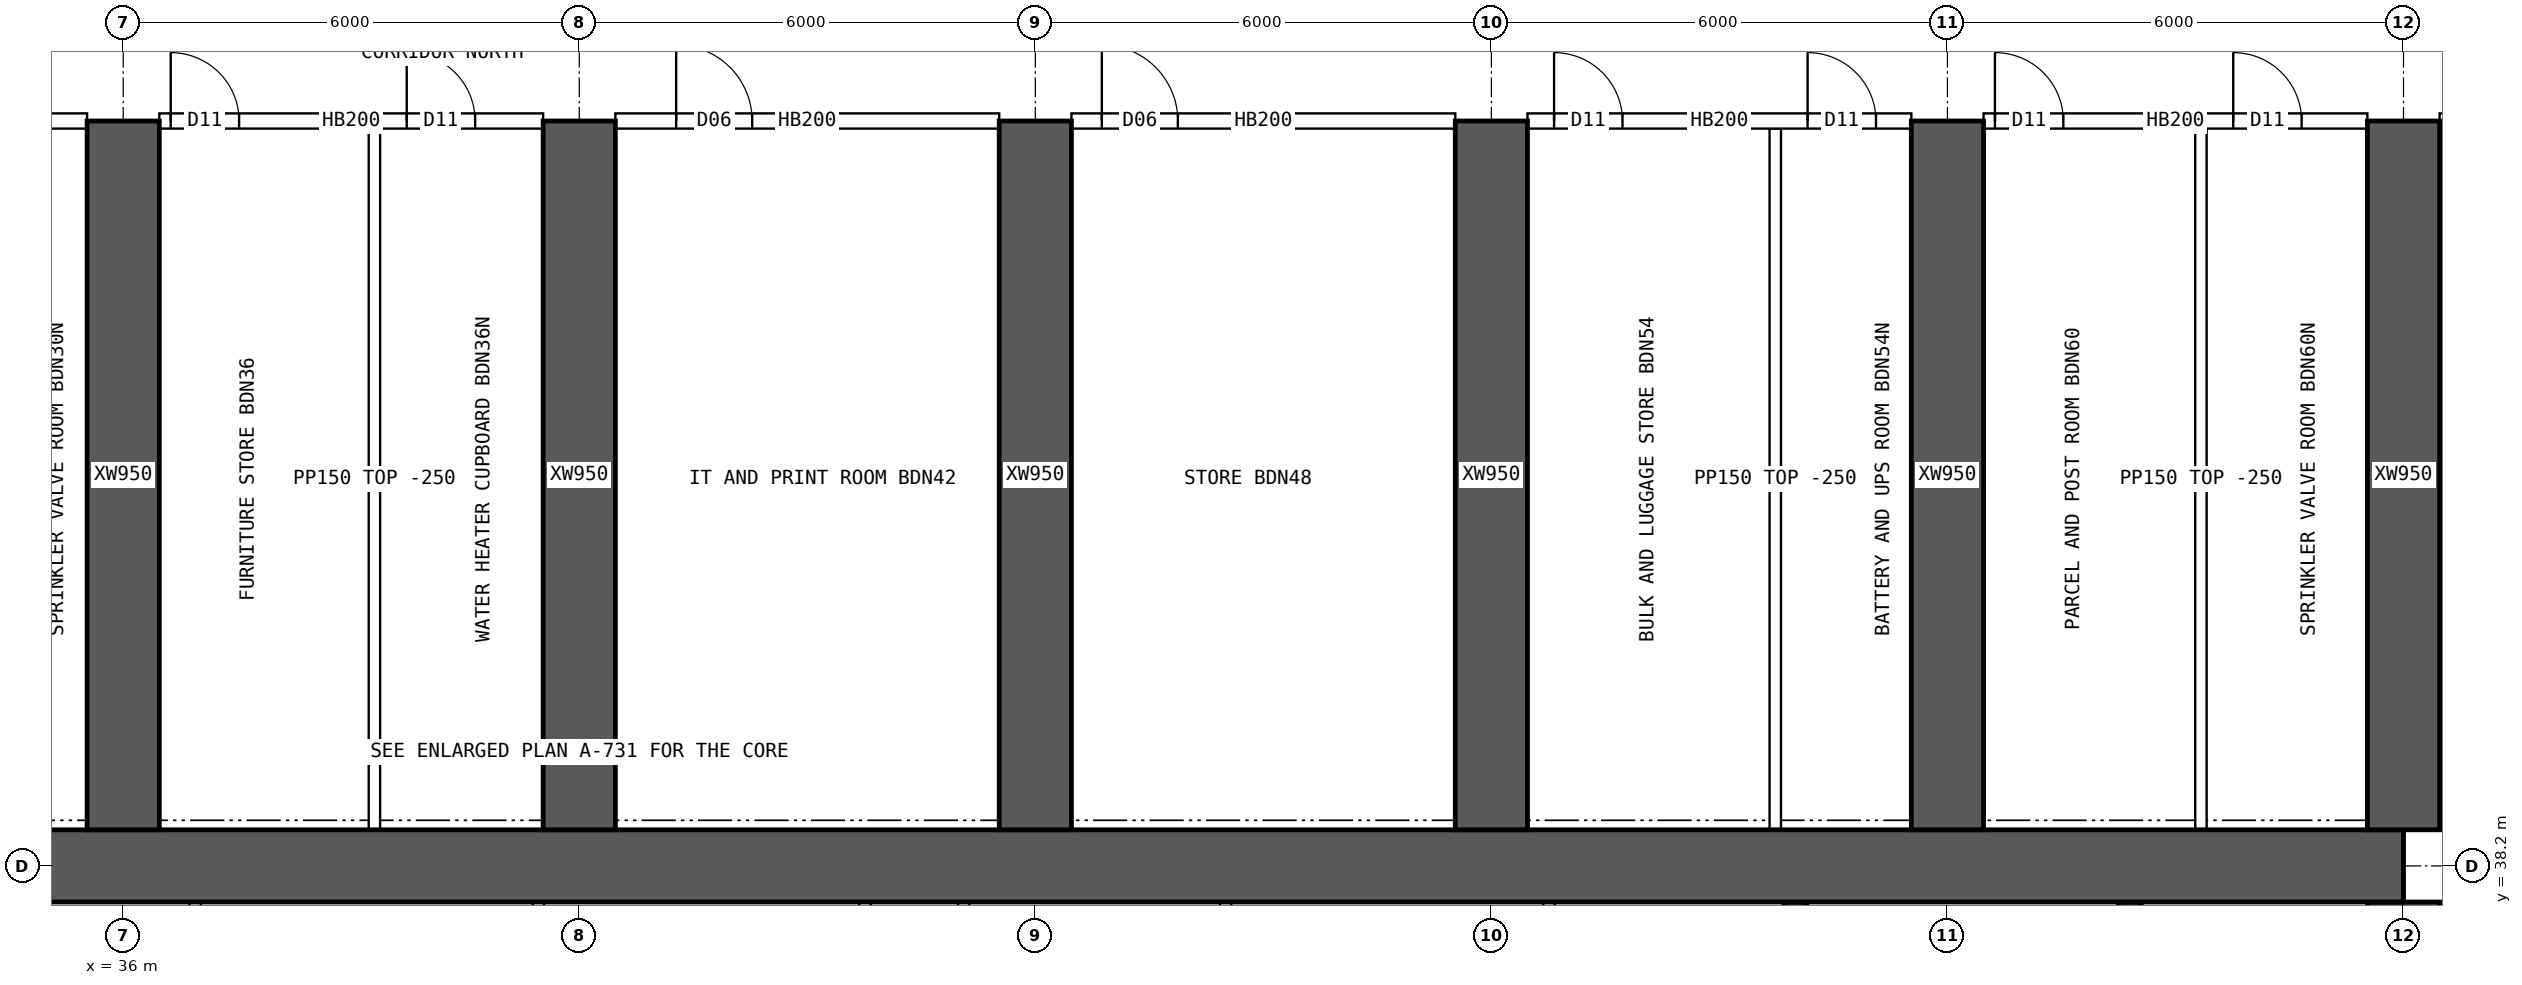
"""IFC4 building model, lengths in metres.
Left out: names, types, materials, properties, quantities, classifications, styles, units other than length and angle.
Written with IfcOpenShell. Run it as: python <this file> out.ifc"""

import sys

from ifc_helpers import new_model, si_unit, direction, frame, frame_2d, origin, place, context, subcontext, project, spatial, rectangle, extrude, element, fill, save


model = new_model("IFC4")
c1 = context("Model", 3, precision=1e-05, world=origin(), true_north=direction((0.0, 1.0)))
c2 = subcontext(c1, "Body", "Model", "MODEL_VIEW")
j1 = project(units=[si_unit("LENGTHUNIT", "METRE"), si_unit("PLANEANGLEUNIT", "RADIAN")], contexts=[c1])
p1 = place(None, origin())
s1 = spatial("IfcSite", under=j1, at=p1, CompositionType="ELEMENT")
p2 = place(p1, origin())
s2 = spatial("IfcBuilding", under=s1, at=p2, CompositionType="ELEMENT")
p3 = place(p2, frame((0.0, 0.0, 114.4)))
s3 = spatial("IfcBuildingStorey", under=s2, at=p3, CompositionType="ELEMENT", Elevation=114.4)
p4 = place(p3, frame((18.0, 38.2, 0.0), z_axis=(0.0, 0.0, 1.0), x_axis=(1.0, 0.0, 0.0)))
e1 = element("IfcWall", 1, at=p4, inside=s3, PredefinedType="SHEAR", context=c2, shape_type="SweptSolid", body=[
    extrude(rectangle(XDim=48.0, YDim=0.95, at=frame_2d((24.0, 0.0))), origin(), (0.0, 0.0, 1.0), 3.75),
])
p5 = place(p3, frame((66.0, 26.275, 0.0), z_axis=(0.0, 0.0, 1.0), x_axis=(0.0, 1.0, 0.0)))
e2 = element("IfcWall", 2, at=p5, inside=s3, PredefinedType="SHEAR", context=c2, shape_type="SweptSolid", body=[
    extrude(rectangle(XDim=11.45, YDim=0.95, at=frame_2d((5.725, 0.0))), origin(), (0.0, 0.0, 1.0), 3.75),
])
p6 = place(p5, frame((5.025, 0.0, 0.0)))
e3 = element("IfcOpeningElement", 3, at=p6, cuts=e2, PredefinedType="OPENING", context=c2, shape_type="SweptSolid", body=[
    extrude(rectangle(XDim=1.2, YDim=2.1, at=frame_2d((0.6, 1.05))), frame((0.0, 0.485, 0.0), z_axis=(0.0, -1.0, 0.0), x_axis=(1.0, 0.0, 0.0)), (0.0, 0.0, 1.0), 0.97),
])
for number, where, z_axis, x_axis in (
    (4, (62.4, 34.75, 0.0), (0.0, 0.0, 1.0), (0.0, 1.0, 0.0)),
    (5, (58.0, 34.75, 0.0), (0.0, 0.0, 1.0), (0.0, 1.0, 0.0)),
):
    element("IfcWall", number, at=place(p3, frame(where, z_axis=z_axis, x_axis=x_axis)), inside=s3, PredefinedType="SHEAR", context=c2, shape_type="SweptSolid", body=[
        extrude(rectangle(XDim=2.975, YDim=0.3, at=frame_2d((1.488, 0.0))), origin(), (0.0, 0.0, 1.0), 3.75),
    ])
for number, where, z_axis, x_axis in (
    (6, (36.0, 38.675, 0.0), (0.0, 0.0, 1.0), (0.0, 1.0, 0.0)),
    (7, (42.0, 38.675, 0.0), (0.0, 0.0, 1.0), (0.0, 1.0, 0.0)),
    (8, (48.0, 38.675, 0.0), (0.0, 0.0, 1.0), (0.0, 1.0, 0.0)),
    (9, (54.0, 38.675, 0.0), (0.0, 0.0, 1.0), (0.0, 1.0, 0.0)),
    (10, (60.0, 38.675, 0.0), (0.0, 0.0, 1.0), (0.0, 1.0, 0.0)),
    (11, (66.0, 38.675, 0.0), (0.0, 0.0, 1.0), (0.0, 1.0, 0.0)),
):
    element("IfcWall", number, at=place(p3, frame(where, z_axis=z_axis, x_axis=x_axis)), inside=s3, PredefinedType="SHEAR", context=c2, shape_type="SweptSolid", body=[
        extrude(rectangle(XDim=9.325, YDim=0.95, at=frame_2d((4.663, 0.0))), origin(), (0.0, 0.0, 1.0), 3.75),
    ])
for number, where, z_axis, x_axis in (
    (12, (36.946, 34.75, 0.0), (0.0, 0.0, 1.0), (0.0, 1.0, 0.0)),
    (13, (41.463, 34.75, 0.0), (0.0, 0.0, 1.0), (0.0, 1.0, 0.0)),
    (14, (45.758, 34.75, 0.0), (0.0, 0.0, 1.0), (0.0, 1.0, 0.0)),
    (15, (47.058, 34.75, 0.0), (0.0, 0.0, 1.0), (0.0, 1.0, 0.0)),
    (16, (50.503, 34.75, 0.0), (0.0, 0.0, 1.0), (0.0, 1.0, 0.0)),
    (17, (54.758, 34.75, 0.0), (0.0, 0.0, 1.0), (0.0, 1.0, 0.0)),
):
    element("IfcWall", number, at=place(p3, frame(where, z_axis=z_axis, x_axis=x_axis)), inside=s3, PredefinedType="SOLIDWALL", context=c2, shape_type="SweptSolid", body=[
        extrude(rectangle(XDim=2.975, YDim=0.15, at=frame_2d((1.488, 0.0))), origin(), (0.0, 0.0, 1.0), 3.5),
    ])
p7 = place(p3, frame((30.475, 48.0, 0.0), z_axis=(0.0, 0.0, 1.0), x_axis=(1.0, 0.0, 0.0)))
e18 = element("IfcWall", 18, at=p7, inside=s3, PredefinedType="SOLIDWALL", context=c2, shape_type="SweptSolid", body=[
    extrude(rectangle(XDim=5.05, YDim=0.2, at=frame_2d((2.525, 0.0))), origin(), (0.0, 0.0, 1.0), 3.5),
])
p8 = place(p7, frame((0.35, 0.0, 0.0)))
e19 = element("IfcOpeningElement", 19, at=p8, cuts=e18, PredefinedType="OPENING", context=c2, shape_type="SweptSolid", body=[
    extrude(rectangle(XDim=0.9, YDim=2.1, at=frame_2d((0.45, 1.05))), frame((0.0, 0.11, 0.0), z_axis=(0.0, -1.0, 0.0), x_axis=(1.0, 0.0, 0.0)), (0.0, 0.0, 1.0), 0.22),
])
p9 = place(p7, frame((3.635, 0.0, 0.0)))
e20 = element("IfcOpeningElement", 20, at=p9, cuts=e18, PredefinedType="OPENING", context=c2, shape_type="SweptSolid", body=[
    extrude(rectangle(XDim=0.9, YDim=2.1, at=frame_2d((0.45, 1.05))), frame((0.0, 0.11, 0.0), z_axis=(0.0, -1.0, 0.0), x_axis=(1.0, 0.0, 0.0)), (0.0, 0.0, 1.0), 0.22),
])
p10 = place(p3, frame((36.475, 48.0, 0.0), z_axis=(0.0, 0.0, 1.0), x_axis=(1.0, 0.0, 0.0)))
e21 = element("IfcWall", 21, at=p10, inside=s3, PredefinedType="SOLIDWALL", context=c2, shape_type="SweptSolid", body=[
    extrude(rectangle(XDim=5.05, YDim=0.2, at=frame_2d((2.525, 0.0))), origin(), (0.0, 0.0, 1.0), 3.5),
])
p11 = place(p10, frame((0.15, 0.0, 0.0)))
e22 = element("IfcOpeningElement", 22, at=p11, cuts=e21, PredefinedType="OPENING", context=c2, shape_type="SweptSolid", body=[
    extrude(rectangle(XDim=0.9, YDim=2.1, at=frame_2d((0.45, 1.05))), frame((0.0, 0.11, 0.0), z_axis=(0.0, -1.0, 0.0), x_axis=(1.0, 0.0, 0.0)), (0.0, 0.0, 1.0), 0.22),
])
p12 = place(p10, frame((3.255, 0.0, 0.0)))
e23 = element("IfcOpeningElement", 23, at=p12, cuts=e21, PredefinedType="OPENING", context=c2, shape_type="SweptSolid", body=[
    extrude(rectangle(XDim=0.9, YDim=2.1, at=frame_2d((0.45, 1.05))), frame((0.0, 0.11, 0.0), z_axis=(0.0, -1.0, 0.0), x_axis=(1.0, 0.0, 0.0)), (0.0, 0.0, 1.0), 0.22),
])
p13 = place(p3, frame((42.475, 48.0, 0.0), z_axis=(0.0, 0.0, 1.0), x_axis=(1.0, 0.0, 0.0)))
e24 = element("IfcWall", 24, at=p13, inside=s3, PredefinedType="SOLIDWALL", context=c2, shape_type="SweptSolid", body=[
    extrude(rectangle(XDim=5.05, YDim=0.2, at=frame_2d((2.525, 0.0))), origin(), (0.0, 0.0, 1.0), 3.5),
])
p14 = place(p13, frame((0.8, 0.0, 0.0)))
e25 = element("IfcOpeningElement", 25, at=p14, cuts=e24, PredefinedType="OPENING", context=c2, shape_type="SweptSolid", body=[
    extrude(rectangle(XDim=1.0, YDim=2.1, at=frame_2d((0.5, 1.05))), frame((0.0, 0.11, 0.0), z_axis=(0.0, -1.0, 0.0), x_axis=(1.0, 0.0, 0.0)), (0.0, 0.0, 1.0), 0.22),
])
p15 = place(p3, frame((48.475, 48.0, 0.0), z_axis=(0.0, 0.0, 1.0), x_axis=(1.0, 0.0, 0.0)))
e26 = element("IfcWall", 26, at=p15, inside=s3, PredefinedType="SOLIDWALL", context=c2, shape_type="SweptSolid", body=[
    extrude(rectangle(XDim=5.05, YDim=0.2, at=frame_2d((2.525, 0.0))), origin(), (0.0, 0.0, 1.0), 3.5),
])
p16 = place(p15, frame((0.4, 0.0, 0.0)))
e27 = element("IfcOpeningElement", 27, at=p16, cuts=e26, PredefinedType="OPENING", context=c2, shape_type="SweptSolid", body=[
    extrude(rectangle(XDim=1.0, YDim=2.1, at=frame_2d((0.5, 1.05))), frame((0.0, 0.11, 0.0), z_axis=(0.0, -1.0, 0.0), x_axis=(1.0, 0.0, 0.0)), (0.0, 0.0, 1.0), 0.22),
])
p17 = place(p3, frame((54.475, 48.0, 0.0), z_axis=(0.0, 0.0, 1.0), x_axis=(1.0, 0.0, 0.0)))
e28 = element("IfcWall", 28, at=p17, inside=s3, PredefinedType="SOLIDWALL", context=c2, shape_type="SweptSolid", body=[
    extrude(rectangle(XDim=5.05, YDim=0.2, at=frame_2d((2.525, 0.0))), origin(), (0.0, 0.0, 1.0), 3.5),
])
p18 = place(p17, frame((0.35, 0.0, 0.0)))
e29 = element("IfcOpeningElement", 29, at=p18, cuts=e28, PredefinedType="OPENING", context=c2, shape_type="SweptSolid", body=[
    extrude(rectangle(XDim=0.9, YDim=2.1, at=frame_2d((0.45, 1.05))), frame((0.0, 0.11, 0.0), z_axis=(0.0, -1.0, 0.0), x_axis=(1.0, 0.0, 0.0)), (0.0, 0.0, 1.0), 0.22),
])
p19 = place(p17, frame((3.685, 0.0, 0.0)))
e30 = element("IfcOpeningElement", 30, at=p19, cuts=e28, PredefinedType="OPENING", context=c2, shape_type="SweptSolid", body=[
    extrude(rectangle(XDim=0.9, YDim=2.1, at=frame_2d((0.45, 1.05))), frame((0.0, 0.11, 0.0), z_axis=(0.0, -1.0, 0.0), x_axis=(1.0, 0.0, 0.0)), (0.0, 0.0, 1.0), 0.22),
])
p20 = place(p3, frame((60.475, 48.0, 0.0), z_axis=(0.0, 0.0, 1.0), x_axis=(1.0, 0.0, 0.0)))
e31 = element("IfcWall", 31, at=p20, inside=s3, PredefinedType="SOLIDWALL", context=c2, shape_type="SweptSolid", body=[
    extrude(rectangle(XDim=5.05, YDim=0.2, at=frame_2d((2.525, 0.0))), origin(), (0.0, 0.0, 1.0), 3.5),
])
p21 = place(p20, frame((0.15, 0.0, 0.0)))
e32 = element("IfcOpeningElement", 32, at=p21, cuts=e31, PredefinedType="OPENING", context=c2, shape_type="SweptSolid", body=[
    extrude(rectangle(XDim=0.9, YDim=2.1, at=frame_2d((0.45, 1.05))), frame((0.0, 0.11, 0.0), z_axis=(0.0, -1.0, 0.0), x_axis=(1.0, 0.0, 0.0)), (0.0, 0.0, 1.0), 0.22),
])
p22 = place(p20, frame((3.285, 0.0, 0.0)))
e33 = element("IfcOpeningElement", 33, at=p22, cuts=e31, PredefinedType="OPENING", context=c2, shape_type="SweptSolid", body=[
    extrude(rectangle(XDim=0.9, YDim=2.1, at=frame_2d((0.45, 1.05))), frame((0.0, 0.11, 0.0), z_axis=(0.0, -1.0, 0.0), x_axis=(1.0, 0.0, 0.0)), (0.0, 0.0, 1.0), 0.22),
])
p23 = place(p3, frame((66.475, 48.0, 0.0), z_axis=(0.0, 0.0, 1.0), x_axis=(1.0, 0.0, 0.0)))
e34 = element("IfcWall", 34, at=p23, inside=s3, PredefinedType="SOLIDWALL", context=c2, shape_type="SweptSolid", body=[
    extrude(rectangle(XDim=1.925, YDim=0.2, at=frame_2d((0.962, 0.0))), origin(), (0.0, 0.0, 1.0), 3.5),
])
p24 = place(p23, frame((0.05, 0.0, 0.0)))
e35 = element("IfcOpeningElement", 35, at=p24, cuts=e34, PredefinedType="OPENING", context=c2, shape_type="SweptSolid", body=[
    extrude(rectangle(XDim=1.2, YDim=2.1, at=frame_2d((0.6, 1.05))), frame((0.0, 0.11, 0.0), z_axis=(0.0, -1.0, 0.0), x_axis=(1.0, 0.0, 0.0)), (0.0, 0.0, 1.0), 0.22),
])
for number, where, z_axis, x_axis in (
    (36, (39.305, 38.675, 0.0), (0.0, 0.0, 1.0), (0.0, 1.0, 0.0)),
    (37, (57.735, 38.675, 0.0), (0.0, 0.0, 1.0), (0.0, 1.0, 0.0)),
    (38, (63.335, 38.675, 0.0), (0.0, 0.0, 1.0), (0.0, 1.0, 0.0)),
):
    element("IfcWall", number, at=place(p3, frame(where, z_axis=z_axis, x_axis=x_axis)), inside=s3, PredefinedType="PARTITIONING", context=c2, shape_type="SweptSolid", body=[
        extrude(rectangle(XDim=9.225, YDim=0.15, at=frame_2d((4.612, 0.0))), origin(), (0.0, 0.0, 1.0), 3.5),
    ])
p25 = place(p11, origin())
e39 = element("IfcDoor", 39, at=p25, inside=s3, OperationType="SINGLE_SWING_LEFT", PredefinedType="DOOR", context=c2, shape_type="SweptSolid", body=[
    extrude(rectangle(XDim=0.9, YDim=2.1, at=frame_2d((0.45, 1.05))), frame((0.0, 0.025, 0.0), z_axis=(0.0, -1.0, 0.0), x_axis=(1.0, 0.0, 0.0)), (0.0, 0.0, 1.0), 0.05),
])
fill(e22, e39)
p26 = place(p12, origin())
e40 = element("IfcDoor", 40, at=p26, inside=s3, OperationType="SINGLE_SWING_LEFT", PredefinedType="DOOR", context=c2, shape_type="SweptSolid", body=[
    extrude(rectangle(XDim=0.9, YDim=2.1, at=frame_2d((0.45, 1.05))), frame((0.0, 0.025, 0.0), z_axis=(0.0, -1.0, 0.0), x_axis=(1.0, 0.0, 0.0)), (0.0, 0.0, 1.0), 0.05),
])
fill(e23, e40)
p27 = place(p14, origin())
e41 = element("IfcDoor", 41, at=p27, inside=s3, OperationType="SINGLE_SWING_LEFT", PredefinedType="DOOR", context=c2, shape_type="SweptSolid", body=[
    extrude(rectangle(XDim=1.0, YDim=2.1, at=frame_2d((0.5, 1.05))), frame((0.0, 0.025, 0.0), z_axis=(0.0, -1.0, 0.0), x_axis=(1.0, 0.0, 0.0)), (0.0, 0.0, 1.0), 0.05),
])
fill(e25, e41)
p28 = place(p16, origin())
e42 = element("IfcDoor", 42, at=p28, inside=s3, OperationType="SINGLE_SWING_LEFT", PredefinedType="DOOR", context=c2, shape_type="SweptSolid", body=[
    extrude(rectangle(XDim=1.0, YDim=2.1, at=frame_2d((0.5, 1.05))), frame((0.0, 0.025, 0.0), z_axis=(0.0, -1.0, 0.0), x_axis=(1.0, 0.0, 0.0)), (0.0, 0.0, 1.0), 0.05),
])
fill(e27, e42)
p29 = place(p18, origin())
e43 = element("IfcDoor", 43, at=p29, inside=s3, OperationType="SINGLE_SWING_LEFT", PredefinedType="DOOR", context=c2, shape_type="SweptSolid", body=[
    extrude(rectangle(XDim=0.9, YDim=2.1, at=frame_2d((0.45, 1.05))), frame((0.0, 0.025, 0.0), z_axis=(0.0, -1.0, 0.0), x_axis=(1.0, 0.0, 0.0)), (0.0, 0.0, 1.0), 0.05),
])
fill(e29, e43)
p30 = place(p19, origin())
e44 = element("IfcDoor", 44, at=p30, inside=s3, OperationType="SINGLE_SWING_LEFT", PredefinedType="DOOR", context=c2, shape_type="SweptSolid", body=[
    extrude(rectangle(XDim=0.9, YDim=2.1, at=frame_2d((0.45, 1.05))), frame((0.0, 0.025, 0.0), z_axis=(0.0, -1.0, 0.0), x_axis=(1.0, 0.0, 0.0)), (0.0, 0.0, 1.0), 0.05),
])
fill(e30, e44)
p31 = place(p21, origin())
e45 = element("IfcDoor", 45, at=p31, inside=s3, OperationType="SINGLE_SWING_LEFT", PredefinedType="DOOR", context=c2, shape_type="SweptSolid", body=[
    extrude(rectangle(XDim=0.9, YDim=2.1, at=frame_2d((0.45, 1.05))), frame((0.0, 0.025, 0.0), z_axis=(0.0, -1.0, 0.0), x_axis=(1.0, 0.0, 0.0)), (0.0, 0.0, 1.0), 0.05),
])
fill(e32, e45)
p32 = place(p22, origin())
e46 = element("IfcDoor", 46, at=p32, inside=s3, OperationType="SINGLE_SWING_LEFT", PredefinedType="DOOR", context=c2, shape_type="SweptSolid", body=[
    extrude(rectangle(XDim=0.9, YDim=2.1, at=frame_2d((0.45, 1.05))), frame((0.0, 0.025, 0.0), z_axis=(0.0, -1.0, 0.0), x_axis=(1.0, 0.0, 0.0)), (0.0, 0.0, 1.0), 0.05),
])
fill(e33, e46)
save(model, sys.argv[1])
